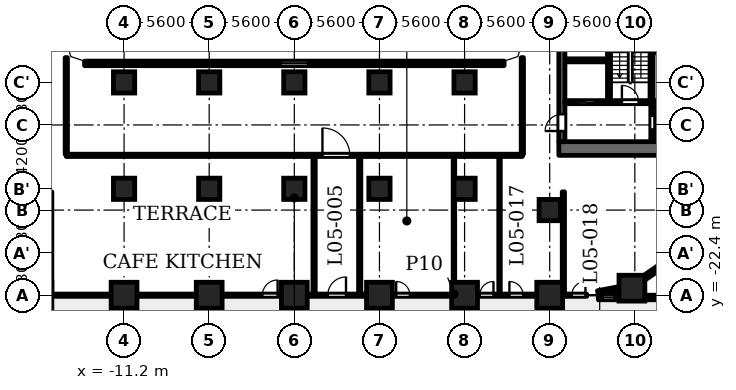
"""IFC4 building model, lengths in metres.
Left out: names, types, materials, properties, quantities, classifications, styles, units other than length and angle.
Written with IfcOpenShell. Run it as: python <this file> out.ifc"""

import sys

from ifc_helpers import new_model, si_unit, direction, frame, frame_2d, origin, origin_2d, place, context, subcontext, project, spatial, polyline, rectangle, outline, extrude, element, fill, save


model = new_model("IFC4")
c1 = context("Model", 3, precision=1e-05, world=origin(), true_north=direction((0.0, 1.0)))
c2 = subcontext(c1, "Body", "Model", "MODEL_VIEW")
j1 = project(units=[si_unit("LENGTHUNIT", "METRE"), si_unit("PLANEANGLEUNIT", "RADIAN")], contexts=[c1])
p1 = place(None, origin())
s1 = spatial("IfcSite", under=j1, at=p1, CompositionType="ELEMENT")
p2 = place(p1, origin())
s2 = spatial("IfcBuilding", under=s1, at=p2, CompositionType="ELEMENT")
p3 = place(p2, frame((0.0, 0.0, 25.7)))
s3 = spatial("IfcBuildingStorey", under=s2, at=p3, CompositionType="ELEMENT", Elevation=25.7)
for number, where, z_axis, x_axis in (
    (1, (-11.2, -22.4, 0.0), (0.0, 0.0, 1.0), (1.0, 0.0, 0.0)),
    (2, (-5.6, -22.4, 0.0), (0.0, 0.0, 1.0), (1.0, 0.0, 0.0)),
    (3, (0.0, -22.4, 0.0), (0.0, 0.0, 1.0), (1.0, 0.0, 0.0)),
    (4, (5.6, -22.4, 0.0), (0.0, 0.0, 1.0), (1.0, 0.0, 0.0)),
    (5, (11.2, -22.4, 0.0), (0.0, 0.0, 1.0), (1.0, 0.0, 0.0)),
    (6, (16.8, -22.4, 0.0), (0.0, 0.0, 1.0), (1.0, 0.0, 0.0)),
    (7, (22.209, -21.938, 0.0), (0.0, 0.0, 1.0), (1.0, 0.0, 0.0)),
):
    element("IfcColumn", number, at=place(p3, frame(where, z_axis=z_axis, x_axis=x_axis)), inside=s3, PredefinedType="COLUMN", context=c2, shape_type="SweptSolid", body=[
        extrude(rectangle(XDim=1.7, YDim=1.7, at=origin_2d()), origin(), (0.0, 0.0, 1.0), 4.8),
    ])
for number, where, z_axis, x_axis in (
    (8, (-11.2, -8.4, 0.0), (0.0, 0.0, 1.0), (1.0, 0.0, 0.0)),
    (9, (-5.6, -8.4, 0.0), (0.0, 0.0, 1.0), (1.0, 0.0, 0.0)),
    (10, (0.0, -8.4, 0.0), (0.0, 0.0, 1.0), (1.0, 0.0, 0.0)),
    (11, (5.6, -8.4, 0.0), (0.0, 0.0, 1.0), (1.0, 0.0, 0.0)),
    (12, (11.2, -8.4, 0.0), (0.0, 0.0, 1.0), (1.0, 0.0, 0.0)),
    (13, (16.8, -16.8, 0.0), (0.0, 0.0, 1.0), (1.0, 0.0, 0.0)),
    (14, (-11.2, -15.4, 0.0), (0.0, 0.0, 1.0), (1.0, 0.0, 0.0)),
    (15, (-5.6, -15.4, 0.0), (0.0, 0.0, 1.0), (1.0, 0.0, 0.0)),
    (16, (0.0, -15.4, 0.0), (0.0, 0.0, 1.0), (1.0, 0.0, 0.0)),
    (17, (5.6, -15.4, 0.0), (0.0, 0.0, 1.0), (1.0, 0.0, 0.0)),
    (18, (11.2, -15.4, 0.0), (0.0, 0.0, 1.0), (1.0, 0.0, 0.0)),
):
    element("IfcColumn", number, at=place(p3, frame(where, z_axis=z_axis, x_axis=x_axis)), inside=s3, PredefinedType="COLUMN", context=c2, shape_type="SweptSolid", body=[
        extrude(rectangle(XDim=1.4, YDim=1.4, at=origin_2d()), origin(), (0.0, 0.0, 1.0), 4.8),
    ])
p4 = place(p3, frame((27.5, -22.55, 0.0), z_axis=(0.0, 0.0, 1.0), x_axis=(-1.0, 0.0, 0.0)))
e19 = element("IfcWall", 19, at=p4, inside=s3, PredefinedType="SOLIDWALL", context=c2, shape_type="SweptSolid", body=[
    extrude(rectangle(XDim=4.441, YDim=0.3, at=frame_2d((2.221, 0.0))), origin(), (0.0, 0.0, 1.0), 4.45),
])
p5 = place(p4, frame((1.321, 0.0, 0.9)))
e20 = element("IfcOpeningElement", 20, at=p5, cuts=e19, PredefinedType="OPENING", context=c2, shape_type="SweptSolid", body=[
    extrude(rectangle(XDim=1.8, YDim=1.25, at=frame_2d((0.9, 0.625))), frame((0.0, 0.16, 0.0), z_axis=(0.0, -1.0, 0.0), x_axis=(1.0, 0.0, 0.0)), (0.0, 0.0, 1.0), 0.32),
])
p6 = place(p3, frame((21.359, -22.55, 0.0), z_axis=(0.0, 0.0, 1.0), x_axis=(-1.0, 0.0, 0.0)))
e21 = element("IfcWall", 21, at=p6, inside=s3, PredefinedType="SOLIDWALL", context=c2, shape_type="SweptSolid", body=[
    extrude(rectangle(XDim=1.359, YDim=0.3, at=frame_2d((0.679, 0.0))), origin(), (0.0, 0.0, 1.0), 3.55),
])
p7 = place(p6, frame((0.279, 0.0, 0.6)))
e22 = element("IfcOpeningElement", 22, at=p7, cuts=e21, PredefinedType="OPENING", context=c2, shape_type="SweptSolid", body=[
    extrude(rectangle(XDim=0.8, YDim=1.55, at=frame_2d((0.4, 0.775))), frame((0.0, 0.16, 0.0), z_axis=(0.0, -1.0, 0.0), x_axis=(1.0, 0.0, 0.0)), (0.0, 0.0, 1.0), 0.32),
])
for number, where, z_axis, x_axis in (
    (23, (19.972, -22.253, 0.0), (0.0, 0.0, 1.0), (0.982, 0.187, 0.0)),
    (24, (22.85, -21.369, 0.0), (0.0, 0.0, 1.0), (0.827, 0.562, 0.0)),
):
    element("IfcWall", number, at=place(p3, frame(where, z_axis=z_axis, x_axis=x_axis)), inside=s3, PredefinedType="SOLIDWALL", context=c2, shape_type="SweptSolid", body=[
        extrude(rectangle(XDim=1.406, YDim=0.3, at=frame_2d((0.703, 0.0))), origin(), (0.0, 0.0, 1.0), 3.55),
    ])
p8 = place(p3, frame((13.8, -7.15, 0.0), z_axis=(0.0, 0.0, 1.0), x_axis=(-1.0, 0.0, 0.0)))
e25 = element("IfcWall", 25, at=p8, inside=s3, PredefinedType="SOLIDWALL", context=c2, shape_type="SweptSolid", body=[
    extrude(rectangle(XDim=27.6, YDim=0.3, at=frame_2d((13.8, 0.0))), origin(), (0.0, 0.0, 1.0), 4.45),
])
p9 = place(p8, frame((12.9, 0.0, 0.9)))
e26 = element("IfcOpeningElement", 26, at=p9, cuts=e25, PredefinedType="OPENING", context=c2, shape_type="SweptSolid", body=[
    extrude(rectangle(XDim=1.8, YDim=1.25, at=frame_2d((0.9, 0.625))), frame((0.0, 0.16, 0.0), z_axis=(0.0, -1.0, 0.0), x_axis=(1.0, 0.0, 0.0)), (0.0, 0.0, 1.0), 0.32),
])
p10 = place(p3, frame((20.7, -9.6, 0.0), z_axis=(0.0, 0.0, 1.0), x_axis=(0.0, 1.0, 0.0)))
e27 = element("IfcWall", 27, at=p10, inside=s3, PredefinedType="SHEAR", context=c2, shape_type="SweptSolid", body=[
    extrude(rectangle(XDim=9.75, YDim=0.2, at=frame_2d((4.875, 0.0))), origin(), (0.0, 0.0, 1.0), 4.45),
])
p11 = place(p3, frame((17.4, -12.75, 0.0), z_axis=(0.0, 0.0, 1.0), x_axis=(1.0, 0.0, 0.0)))
e28 = element("IfcWall", 28, at=p11, inside=s3, PredefinedType="SHEAR", context=c2, shape_type="SweptSolid", body=[
    extrude(rectangle(XDim=10.4, YDim=0.9, at=frame_2d((5.2, 0.0))), origin(), (0.0, 0.0, 1.0), 4.45),
])
p12 = place(p3, frame((17.6, -12.3, 0.0), z_axis=(0.0, 0.0, 1.0), x_axis=(0.0, 1.0, 0.0)))
e29 = element("IfcWall", 29, at=p12, inside=s3, PredefinedType="SHEAR", context=c2, shape_type="SweptSolid", body=[
    extrude(rectangle(XDim=24.6, YDim=0.4, at=frame_2d((12.3, 0.0))), origin(), (0.0, 0.0, 1.0), 4.45),
])
p13 = place(p12, frame((6.0, 0.0, 0.0)))
e30 = element("IfcOpeningElement", 30, at=p13, cuts=e29, PredefinedType="OPENING", context=c2, shape_type="SweptSolid", body=[
    extrude(rectangle(XDim=1.1, YDim=2.1, at=frame_2d((0.55, 1.05))), frame((0.0, 0.21, 0.0), z_axis=(0.0, -1.0, 0.0), x_axis=(1.0, 0.0, 0.0)), (0.0, 0.0, 1.0), 0.42),
])
p14 = place(p12, frame((8.4, 0.0, 0.0)))
e31 = element("IfcOpeningElement", 31, at=p14, cuts=e29, PredefinedType="OPENING", context=c2, shape_type="SweptSolid", body=[
    extrude(rectangle(XDim=1.1, YDim=2.1, at=frame_2d((0.55, 1.05))), frame((0.0, 0.21, 0.0), z_axis=(0.0, -1.0, 0.0), x_axis=(1.0, 0.0, 0.0)), (0.0, 0.0, 1.0), 0.42),
])
p15 = place(p12, frame((10.8, 0.0, 0.0)))
e32 = element("IfcOpeningElement", 32, at=p15, cuts=e29, PredefinedType="OPENING", context=c2, shape_type="SweptSolid", body=[
    extrude(rectangle(XDim=1.1, YDim=2.1, at=frame_2d((0.55, 1.05))), frame((0.0, 0.21, 0.0), z_axis=(0.0, -1.0, 0.0), x_axis=(1.0, 0.0, 0.0)), (0.0, 0.0, 1.0), 0.42),
])
p16 = place(p12, frame((16.75, 0.0, 0.0)))
e33 = element("IfcOpeningElement", 33, at=p16, cuts=e29, PredefinedType="OPENING", context=c2, shape_type="SweptSolid", body=[
    extrude(rectangle(XDim=0.9, YDim=2.1, at=frame_2d((0.45, 1.05))), frame((0.0, 0.21, 0.0), z_axis=(0.0, -1.0, 0.0), x_axis=(1.0, 0.0, 0.0)), (0.0, 0.0, 1.0), 0.42),
])
p17 = place(p12, frame((22.8, 0.0, 0.0)))
e34 = element("IfcOpeningElement", 34, at=p17, cuts=e29, PredefinedType="OPENING", context=c2, shape_type="SweptSolid", body=[
    extrude(rectangle(XDim=1.1, YDim=2.1, at=frame_2d((0.55, 1.05))), frame((0.0, 0.21, 0.0), z_axis=(0.0, -1.0, 0.0), x_axis=(1.0, 0.0, 0.0)), (0.0, 0.0, 1.0), 0.42),
])
p18 = place(p12, frame((0.7, 0.0, 0.0)))
e35 = element("IfcOpeningElement", 35, at=p18, cuts=e29, PredefinedType="OPENING", context=c2, shape_type="SweptSolid", body=[
    extrude(rectangle(XDim=1.1, YDim=2.1, at=frame_2d((0.55, 1.05))), frame((0.0, 0.21, 0.0), z_axis=(0.0, -1.0, 0.0), x_axis=(1.0, 0.0, 0.0)), (0.0, 0.0, 1.0), 0.42),
])
p19 = place(p12, frame((12.775, 0.0, 0.0)))
e36 = element("IfcOpeningElement", 36, at=p19, cuts=e29, PredefinedType="OPENING", context=c2, shape_type="SweptSolid", body=[
    extrude(rectangle(XDim=1.8, YDim=2.1, at=frame_2d((0.9, 1.05))), frame((0.0, 0.21, 0.0), z_axis=(0.0, -1.0, 0.0), x_axis=(1.0, 0.0, 0.0)), (0.0, 0.0, 1.0), 0.42),
])
p20 = place(p3, frame((23.55, -12.3, 0.0), z_axis=(0.0, 0.0, 1.0), x_axis=(0.0, 1.0, 0.0)))
e37 = element("IfcWall", 37, at=p20, inside=s3, PredefinedType="PARTITIONING", context=c2, shape_type="SweptSolid", body=[
    extrude(rectangle(XDim=2.5, YDim=0.2, at=frame_2d((1.25, 0.0))), origin(), (0.0, 0.0, 1.0), 4.45),
])
p21 = place(p20, frame((0.8, 0.0, 0.0)))
e38 = element("IfcOpeningElement", 38, at=p21, cuts=e37, PredefinedType="OPENING", context=c2, shape_type="SweptSolid", body=[
    extrude(rectangle(XDim=0.9, YDim=2.1, at=frame_2d((0.45, 1.05))), frame((0.0, 0.11, 0.0), z_axis=(0.0, -1.0, 0.0), x_axis=(1.0, 0.0, 0.0)), (0.0, 0.0, 1.0), 0.22),
])
p22 = place(p3, frame((23.6, -6.35, 0.0), z_axis=(0.0, 0.0, 1.0), x_axis=(1.0, 0.0, 0.0)))
e39 = element("IfcWall", 39, at=p22, inside=s3, PredefinedType="PARTITIONING", context=c2, shape_type="SweptSolid", body=[
    extrude(rectangle(XDim=2.5, YDim=0.2, at=frame_2d((1.25, 0.0))), origin(), (0.0, 0.0, 1.0), 4.45),
])
p23 = place(p22, frame((0.8, 0.0, 0.0)))
e40 = element("IfcOpeningElement", 40, at=p23, cuts=e39, PredefinedType="OPENING", context=c2, shape_type="SweptSolid", body=[
    extrude(rectangle(XDim=0.9, YDim=2.1, at=frame_2d((0.45, 1.05))), frame((0.0, 0.11, 0.0), z_axis=(0.0, -1.0, 0.0), x_axis=(1.0, 0.0, 0.0)), (0.0, 0.0, 1.0), 0.22),
])
p24 = place(p3, frame((17.8, -9.7, 0.0), z_axis=(0.0, 0.0, 1.0), x_axis=(1.0, 0.0, 0.0)))
e41 = element("IfcWall", 41, at=p24, inside=s3, PredefinedType="SHEAR", context=c2, shape_type="SweptSolid", body=[
    extrude(rectangle(XDim=8.3, YDim=0.2, at=frame_2d((4.15, 0.0))), origin(), (0.0, 0.0, 1.0), 4.45),
])
p25 = place(p24, frame((0.85, 0.0, 0.0)))
e42 = element("IfcOpeningElement", 42, at=p25, cuts=e41, PredefinedType="OPENING", context=c2, shape_type="SweptSolid", body=[
    extrude(rectangle(XDim=1.1, YDim=2.1, at=frame_2d((0.55, 1.05))), frame((0.0, 0.11, 0.0), z_axis=(0.0, -1.0, 0.0), x_axis=(1.0, 0.0, 0.0)), (0.0, 0.0, 1.0), 0.22),
])
p26 = place(p24, frame((3.75, 0.0, 0.0)))
e43 = element("IfcOpeningElement", 43, at=p26, cuts=e41, PredefinedType="OPENING", context=c2, shape_type="SweptSolid", body=[
    extrude(rectangle(XDim=1.1, YDim=2.1, at=frame_2d((0.55, 1.05))), frame((0.0, 0.11, 0.0), z_axis=(0.0, -1.0, 0.0), x_axis=(1.0, 0.0, 0.0)), (0.0, 0.0, 1.0), 0.22),
])
p27 = place(p3, frame((17.8, -6.95, 0.0), z_axis=(0.0, 0.0, 1.0), x_axis=(1.0, 0.0, 0.0)))
e44 = element("IfcWall", 44, at=p27, inside=s3, PredefinedType="PARTITIONING", context=c2, shape_type="SweptSolid", body=[
    extrude(rectangle(XDim=2.8, YDim=0.2, at=frame_2d((1.4, 0.0))), origin(), (0.0, 0.0, 1.0), 4.45),
])
p28 = place(p3, frame((23.5, -9.6, 0.0), z_axis=(0.0, 0.0, 1.0), x_axis=(0.0, 1.0, 0.0)))
e45 = element("IfcWall", 45, at=p28, inside=s3, PredefinedType="SHEAR", context=c2, shape_type="SweptSolid", body=[
    extrude(rectangle(XDim=6.9, YDim=0.2, at=frame_2d((3.45, 0.0))), origin(), (0.0, 0.0, 1.0), 4.45),
])
p29 = place(p3, frame((-18.98, -22.4, 0.0), z_axis=(0.0, 0.0, 1.0), x_axis=(1.0, 0.0, 0.0)))
e46 = element("IfcWall", 46, at=p29, inside=s3, PredefinedType="PARTITIONING", context=c2, shape_type="SweptSolid", body=[
    extrude(rectangle(XDim=38.211, YDim=0.15, at=frame_2d((19.105, 0.0))), origin(), (0.0, 0.0, 1.0), 3.55),
])
p30 = place(p29, frame((21.18, 0.0, 0.0)))
e47 = element("IfcOpeningElement", 47, at=p30, cuts=e46, PredefinedType="OPENING", context=c2, shape_type="SweptSolid", body=[
    extrude(rectangle(XDim=1.2, YDim=2.1, at=frame_2d((0.6, 1.05))), frame((0.0, 0.085, 0.0), z_axis=(0.0, -1.0, 0.0), x_axis=(1.0, 0.0, 0.0)), (0.0, 0.0, 1.0), 0.17),
])
p31 = place(p29, frame((0.08, 0.0, 0.0)))
e48 = element("IfcOpeningElement", 48, at=p31, cuts=e46, PredefinedType="OPENING", context=c2, shape_type="SweptSolid", body=[
    extrude(rectangle(XDim=1.0, YDim=2.1, at=frame_2d((0.5, 1.05))), frame((0.0, 0.085, 0.0), z_axis=(0.0, -1.0, 0.0), x_axis=(1.0, 0.0, 0.0)), (0.0, 0.0, 1.0), 0.17),
])
p32 = place(p29, frame((16.88, 0.0, 0.0)))
e49 = element("IfcOpeningElement", 49, at=p32, cuts=e46, PredefinedType="OPENING", context=c2, shape_type="SweptSolid", body=[
    extrude(rectangle(XDim=1.0, YDim=2.1, at=frame_2d((0.5, 1.05))), frame((0.0, 0.085, 0.0), z_axis=(0.0, -1.0, 0.0), x_axis=(1.0, 0.0, 0.0)), (0.0, 0.0, 1.0), 0.17),
])
p33 = place(p29, frame((25.68, 0.0, 0.0)))
e50 = element("IfcOpeningElement", 50, at=p33, cuts=e46, PredefinedType="OPENING", context=c2, shape_type="SweptSolid", body=[
    extrude(rectangle(XDim=0.9, YDim=2.1, at=frame_2d((0.45, 1.05))), frame((0.0, 0.085, 0.0), z_axis=(0.0, -1.0, 0.0), x_axis=(1.0, 0.0, 0.0)), (0.0, 0.0, 1.0), 0.17),
])
p34 = place(p29, frame((31.18, 0.0, 0.0)))
e51 = element("IfcOpeningElement", 51, at=p34, cuts=e46, PredefinedType="OPENING", context=c2, shape_type="SweptSolid", body=[
    extrude(rectangle(XDim=0.9, YDim=2.1, at=frame_2d((0.45, 1.05))), frame((0.0, 0.085, 0.0), z_axis=(0.0, -1.0, 0.0), x_axis=(1.0, 0.0, 0.0)), (0.0, 0.0, 1.0), 0.17),
])
p35 = place(p29, frame((33.13, 0.0, 0.0)))
e52 = element("IfcOpeningElement", 52, at=p35, cuts=e46, PredefinedType="OPENING", context=c2, shape_type="SweptSolid", body=[
    extrude(rectangle(XDim=0.9, YDim=2.1, at=frame_2d((0.45, 1.05))), frame((0.0, 0.085, 0.0), z_axis=(0.0, -1.0, 0.0), x_axis=(1.0, 0.0, 0.0)), (0.0, 0.0, 1.0), 0.17),
])
p36 = place(p29, frame((37.231, 0.0, 0.0)))
e53 = element("IfcOpeningElement", 53, at=p36, cuts=e46, PredefinedType="OPENING", context=c2, shape_type="SweptSolid", body=[
    extrude(rectangle(XDim=0.9, YDim=2.1, at=frame_2d((0.45, 1.05))), frame((0.0, 0.085, 0.0), z_axis=(0.0, -1.0, 0.0), x_axis=(1.0, 0.0, 0.0)), (0.0, 0.0, 1.0), 0.17),
])
p37 = place(p3, frame((-15.005, -13.2, 0.0), z_axis=(0.0, 0.0, 1.0), x_axis=(1.0, 0.0, 0.0)))
e54 = element("IfcWall", 54, at=p37, inside=s3, PredefinedType="PARTITIONING", context=c2, shape_type="SweptSolid", body=[
    extrude(rectangle(XDim=30.01, YDim=0.15, at=frame_2d((15.005, 0.0))), origin(), (0.0, 0.0, 1.0), 4.45),
])
p38 = place(p37, frame((16.855, 0.0, 0.0)))
e55 = element("IfcOpeningElement", 55, at=p38, cuts=e54, PredefinedType="OPENING", context=c2, shape_type="SweptSolid", body=[
    extrude(rectangle(XDim=1.8, YDim=2.1, at=frame_2d((0.9, 1.05))), frame((0.0, 0.085, 0.0), z_axis=(0.0, -1.0, 0.0), x_axis=(1.0, 0.0, 0.0)), (0.0, 0.0, 1.0), 0.17),
])
p39 = place(p3, frame((-15.0, -13.125, 0.0), z_axis=(0.0, 0.0, 1.0), x_axis=(0.0, 1.0, 0.0)))
e56 = element("IfcWall", 56, at=p39, inside=s3, PredefinedType="PARTITIONING", context=c2, shape_type="SweptSolid", body=[
    extrude(rectangle(XDim=6.356, YDim=0.15, at=frame_2d((3.178, 0.0))), origin(), (0.0, 0.0, 1.0), 4.45),
])
for number, where, z_axis, x_axis in (
    (57, (1.3, -22.325, 0.0), (0.0, 0.0, 1.0), (0.0, 1.0, 0.0)),
    (58, (4.3, -22.325, 0.0), (0.0, 0.0, 1.0), (0.0, 1.0, 0.0)),
):
    element("IfcWall", number, at=place(p3, frame(where, z_axis=z_axis, x_axis=x_axis)), inside=s3, PredefinedType="PARTITIONING", context=c2, shape_type="SweptSolid", body=[
        extrude(rectangle(XDim=9.05, YDim=0.15, at=frame_2d((4.525, 0.0))), origin(), (0.0, 0.0, 1.0), 4.45),
    ])
for number, where, z_axis, x_axis in (
    (59, (10.5, -22.325, 0.0), (0.0, 0.0, 1.0), (0.0, 1.0, 0.0)),
    (60, (13.5, -22.325, 0.0), (0.0, 0.0, 1.0), (0.0, 1.0, 0.0)),
):
    element("IfcWall", number, at=place(p3, frame(where, z_axis=z_axis, x_axis=x_axis)), inside=s3, PredefinedType="PARTITIONING", context=c2, shape_type="SweptSolid", body=[
        extrude(rectangle(XDim=9.05, YDim=0.1, at=frame_2d((4.525, 0.0))), origin(), (0.0, 0.0, 1.0), 4.45),
    ])
p40 = place(p3, frame((15.0, -13.125, 0.0), z_axis=(0.0, 0.0, 1.0), x_axis=(0.0, 1.0, 0.0)))
e61 = element("IfcWall", 61, at=p40, inside=s3, PredefinedType="PARTITIONING", context=c2, shape_type="SweptSolid", body=[
    extrude(rectangle(XDim=6.356, YDim=0.15, at=frame_2d((3.178, 0.0))), origin(), (0.0, 0.0, 1.0), 4.45),
])
p41 = place(p3, frame((17.7, -22.325, 0.0), z_axis=(0.0, 0.0, 1.0), x_axis=(0.0, 1.0, 0.0)))
e62 = element("IfcWall", 62, at=p41, inside=s3, PredefinedType="PARTITIONING", context=c2, shape_type="SweptSolid", body=[
    extrude(rectangle(XDim=6.725, YDim=0.15, at=frame_2d((3.362, 0.0))), origin(), (0.0, 0.0, 1.0), 4.45),
])
p42 = place(p3, origin())
e63 = element("IfcWall", 63, at=p42, inside=s3, PredefinedType="SOLIDWALL", context=c2, shape_type="SweptSolid", body=[
    extrude(outline(polyline([(19.944, -22.105), (19.251, -22.238), (19.251, -22.7), (20.0, -22.7), (20.0, -22.4), (19.944, -22.105)])), origin(), (0.0, 0.0, 1.0), 3.55),
])
e64 = element("IfcWall", 64, at=p42, inside=s3, PredefinedType="SOLIDWALL", context=c2, shape_type="SweptSolid", body=[
    extrude(outline(polyline([(14.937, -6.937), (15.3, -5.849), (15.3, -5.8), (15.0, -5.8), (14.7, -6.7), (13.8, -7.0), (13.8, -7.3), (13.849, -7.3), (14.937, -6.937)])), origin(), (0.0, 0.0, 1.0), 4.45),
])
e65 = element("IfcWall", 65, at=p42, inside=s3, PredefinedType="SOLIDWALL", context=c2, shape_type="SweptSolid", body=[
    extrude(outline(polyline([(-14.937, -6.937), (-13.849, -7.3), (-13.8, -7.3), (-13.8, -7.0), (-14.7, -6.7), (-15.0, -5.8), (-15.3, -5.8), (-15.3, -5.849), (-14.937, -6.937)])), origin(), (0.0, 0.0, 1.0), 4.45),
])
p43 = place(p25, origin())
e66 = element("IfcDoor", 66, at=p43, inside=s3, OperationType="DOUBLE_DOOR_SLIDING", PredefinedType="DOOR", context=c2, shape_type="SweptSolid", body=[
    extrude(rectangle(XDim=1.1, YDim=2.1, at=frame_2d((0.55, 1.05))), frame((0.0, 0.025, 0.0), z_axis=(0.0, -1.0, 0.0), x_axis=(1.0, 0.0, 0.0)), (0.0, 0.0, 1.0), 0.05),
])
fill(e42, e66)
p44 = place(p18, origin())
e67 = element("IfcDoor", 67, at=p44, inside=s3, OperationType="SINGLE_SWING_RIGHT", PredefinedType="DOOR", context=c2, shape_type="SweptSolid", body=[
    extrude(rectangle(XDim=1.1, YDim=2.1, at=frame_2d((0.55, 1.05))), frame((0.0, 0.025, 0.0), z_axis=(0.0, -1.0, 0.0), x_axis=(1.0, 0.0, 0.0)), (0.0, 0.0, 1.0), 0.05),
])
fill(e35, e67)
p45 = place(p21, origin())
e68 = element("IfcDoor", 68, at=p45, inside=s3, OperationType="SINGLE_SWING_LEFT", PredefinedType="DOOR", context=c2, shape_type="SweptSolid", body=[
    extrude(rectangle(XDim=0.9, YDim=2.1, at=frame_2d((0.45, 1.05))), frame((0.0, 0.025, 0.0), z_axis=(0.0, -1.0, 0.0), x_axis=(1.0, 0.0, 0.0)), (0.0, 0.0, 1.0), 0.05),
])
fill(e38, e68)
p46 = place(p26, origin())
e69 = element("IfcDoor", 69, at=p46, inside=s3, OperationType="SINGLE_SWING_RIGHT", PredefinedType="DOOR", context=c2, shape_type="SweptSolid", body=[
    extrude(rectangle(XDim=1.1, YDim=2.1, at=frame_2d((0.55, 1.05))), frame((0.0, 0.025, 0.0), z_axis=(0.0, -1.0, 0.0), x_axis=(1.0, 0.0, 0.0)), (0.0, 0.0, 1.0), 0.05),
])
fill(e43, e69)
p47 = place(p38, origin())
e70 = element("IfcDoor", 70, at=p47, inside=s3, OperationType="SINGLE_SWING_RIGHT", PredefinedType="DOOR", context=c2, shape_type="SweptSolid", body=[
    extrude(rectangle(XDim=1.8, YDim=2.1, at=frame_2d((0.9, 1.05))), frame((0.0, 0.025, 0.0), z_axis=(0.0, -1.0, 0.0), x_axis=(1.0, 0.0, 0.0)), (0.0, 0.0, 1.0), 0.05),
])
fill(e55, e70)
p48 = place(p30, origin())
e71 = element("IfcDoor", 71, at=p48, inside=s3, OperationType="SINGLE_SWING_LEFT", PredefinedType="DOOR", context=c2, shape_type="SweptSolid", body=[
    extrude(rectangle(XDim=1.2, YDim=2.1, at=frame_2d((0.6, 1.05))), frame((0.0, 0.025, 0.0), z_axis=(0.0, -1.0, 0.0), x_axis=(1.0, 0.0, 0.0)), (0.0, 0.0, 1.0), 0.05),
])
fill(e47, e71)
p49 = place(p32, origin())
e72 = element("IfcDoor", 72, at=p49, inside=s3, OperationType="SINGLE_SWING_LEFT", PredefinedType="DOOR", context=c2, shape_type="SweptSolid", body=[
    extrude(rectangle(XDim=1.0, YDim=2.1, at=frame_2d((0.5, 1.05))), frame((0.0, 0.025, 0.0), z_axis=(0.0, -1.0, 0.0), x_axis=(1.0, 0.0, 0.0)), (0.0, 0.0, 1.0), 0.05),
])
fill(e49, e72)
p50 = place(p33, origin())
e73 = element("IfcDoor", 73, at=p50, inside=s3, OperationType="SINGLE_SWING_RIGHT", PredefinedType="DOOR", context=c2, shape_type="SweptSolid", body=[
    extrude(rectangle(XDim=0.9, YDim=2.1, at=frame_2d((0.45, 1.05))), frame((0.0, 0.025, 0.0), z_axis=(0.0, -1.0, 0.0), x_axis=(1.0, 0.0, 0.0)), (0.0, 0.0, 1.0), 0.05),
])
fill(e50, e73)
p51 = place(p34, origin())
e74 = element("IfcDoor", 74, at=p51, inside=s3, OperationType="SINGLE_SWING_LEFT", PredefinedType="DOOR", context=c2, shape_type="SweptSolid", body=[
    extrude(rectangle(XDim=0.9, YDim=2.1, at=frame_2d((0.45, 1.05))), frame((0.0, 0.025, 0.0), z_axis=(0.0, -1.0, 0.0), x_axis=(1.0, 0.0, 0.0)), (0.0, 0.0, 1.0), 0.05),
])
fill(e51, e74)
p52 = place(p35, origin())
e75 = element("IfcDoor", 75, at=p52, inside=s3, OperationType="SINGLE_SWING_RIGHT", PredefinedType="DOOR", context=c2, shape_type="SweptSolid", body=[
    extrude(rectangle(XDim=0.9, YDim=2.1, at=frame_2d((0.45, 1.05))), frame((0.0, 0.025, 0.0), z_axis=(0.0, -1.0, 0.0), x_axis=(1.0, 0.0, 0.0)), (0.0, 0.0, 1.0), 0.05),
])
fill(e52, e75)
p53 = place(p36, origin())
e76 = element("IfcDoor", 76, at=p53, inside=s3, OperationType="SINGLE_SWING_LEFT", PredefinedType="DOOR", context=c2, shape_type="SweptSolid", body=[
    extrude(rectangle(XDim=0.9, YDim=2.1, at=frame_2d((0.45, 1.05))), frame((0.0, 0.025, 0.0), z_axis=(0.0, -1.0, 0.0), x_axis=(1.0, 0.0, 0.0)), (0.0, 0.0, 1.0), 0.05),
])
fill(e53, e76)
p54 = place(p7, origin())
e77 = element("IfcWindow", 77, at=p54, inside=s3, PartitioningType="SINGLE_PANEL", PredefinedType="WINDOW", context=c2, shape_type="SweptSolid", body=[
    extrude(rectangle(XDim=0.8, YDim=1.55, at=frame_2d((0.4, 0.775))), frame((0.0, 0.03, 0.0), z_axis=(0.0, -1.0, 0.0), x_axis=(1.0, 0.0, 0.0)), (0.0, 0.0, 1.0), 0.06),
])
fill(e22, e77)
p55 = place(p9, origin())
e78 = element("IfcWindow", 78, at=p55, inside=s3, PartitioningType="SINGLE_PANEL", PredefinedType="WINDOW", context=c2, shape_type="SweptSolid", body=[
    extrude(rectangle(XDim=1.8, YDim=1.25, at=frame_2d((0.9, 0.625))), frame((0.0, 0.03, 0.0), z_axis=(0.0, -1.0, 0.0), x_axis=(1.0, 0.0, 0.0)), (0.0, 0.0, 1.0), 0.06),
])
fill(e26, e78)
save(model, sys.argv[1])
